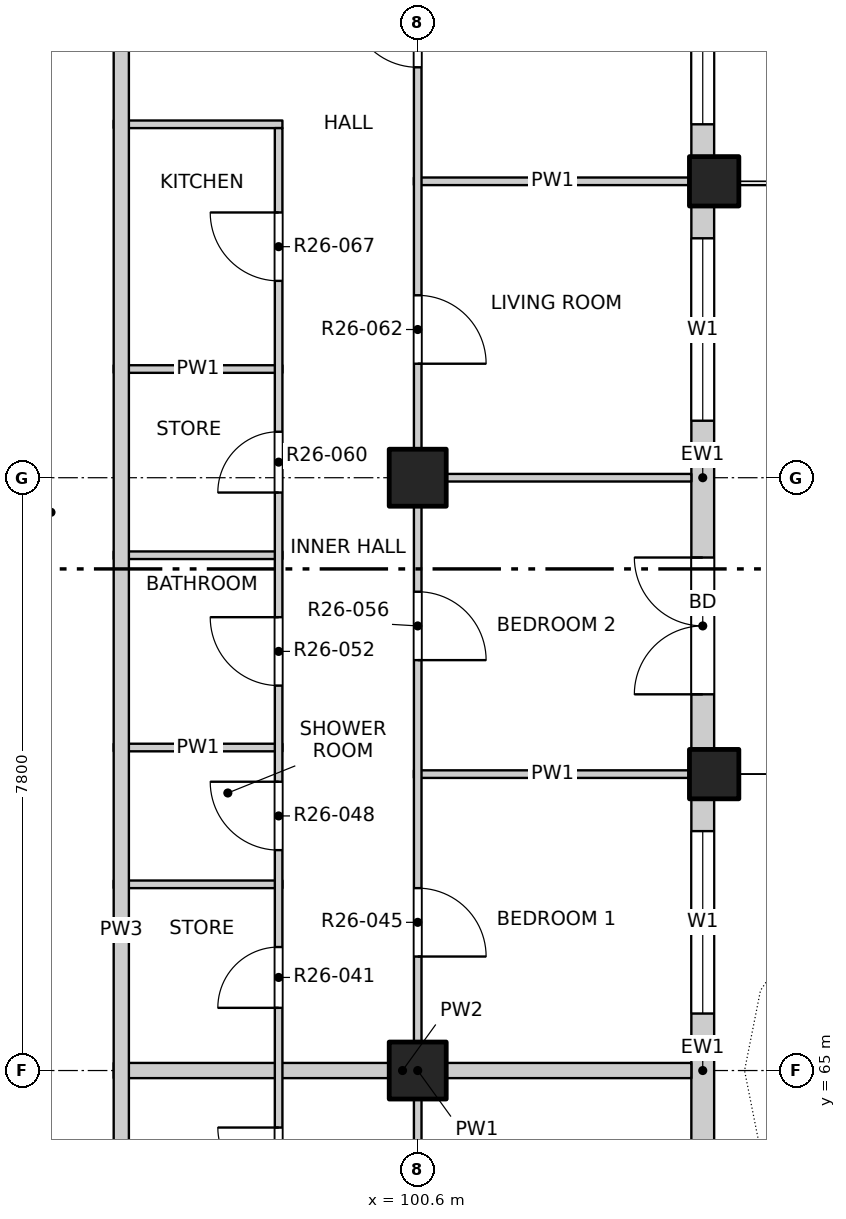
"""IFC4 building model, lengths in metres.
Left out: names, types, materials, properties, quantities, classifications, styles, units other than length and angle.
Written with IfcOpenShell. Run it as: python <this file> out.ifc"""

import sys

from ifc_helpers import new_model, si_unit, direction, frame, frame_2d, origin, origin_2d, place, context, subcontext, project, spatial, rectangle, extrude, element, fill, save


model = new_model("IFC4")
c1 = context("Model", 3, precision=1e-05, world=origin(), true_north=direction((0.0, 1.0)))
c2 = subcontext(c1, "Body", "Model", "MODEL_VIEW")
j1 = project(units=[si_unit("LENGTHUNIT", "METRE"), si_unit("PLANEANGLEUNIT", "RADIAN")], contexts=[c1])
p1 = place(None, origin())
s1 = spatial("IfcSite", under=j1, at=p1, CompositionType="ELEMENT")
p2 = place(p1, origin())
s2 = spatial("IfcBuilding", under=s1, at=p2, CompositionType="ELEMENT")
p3 = place(p2, frame((0.0, 0.0, 259.6)))
s3 = spatial("IfcBuildingStorey", under=s2, at=p3, CompositionType="ELEMENT", Elevation=259.6)
for number, where, z_axis, x_axis in (
    (1, (104.5, 68.9, -0.25), (0.0, 0.0, 1.0), (1.0, 0.0, 0.0)),
    (2, (104.5, 76.7, -0.25), (0.0, 0.0, 1.0), (1.0, 0.0, 0.0)),
):
    element("IfcColumn", number, at=place(p3, frame(where, z_axis=z_axis, x_axis=x_axis)), inside=s3, PredefinedType="COLUMN", context=c2, shape_type="SweptSolid", body=[
        extrude(rectangle(XDim=0.65, YDim=0.65, at=origin_2d()), origin(), (0.0, 0.0, 1.0), 3.4),
    ])
for number, where, z_axis, x_axis in (
    (3, (100.6, 65.0, -0.25), (0.0, 0.0, 1.0), (1.0, 0.0, 0.0)),
    (4, (100.6, 72.8, -0.25), (0.0, 0.0, 1.0), (1.0, 0.0, 0.0)),
):
    element("IfcColumn", number, at=place(p3, frame(where, z_axis=z_axis, x_axis=x_axis)), inside=s3, PredefinedType="COLUMN", context=c2, shape_type="SweptSolid", body=[
        extrude(rectangle(XDim=0.75, YDim=0.75, at=origin_2d()), origin(), (0.0, 0.0, 1.0), 3.4),
    ])
p4 = place(p3, frame((104.35, 61.425, 0.0), z_axis=(0.0, 0.0, 1.0), x_axis=(0.0, 1.0, 0.0)))
e5 = element("IfcWall", 5, at=p4, inside=s3, PredefinedType="SOLIDWALL", context=c2, shape_type="SweptSolid", body=[
    extrude(rectangle(XDim=7.15, YDim=0.3, at=frame_2d((3.575, 0.0))), origin(), (0.0, 0.0, 1.0), 3.15),
])
p5 = place(p4, frame((0.725, 0.0, 0.0)))
e6 = element("IfcOpeningElement", 6, at=p5, cuts=e5, PredefinedType="OPENING", context=c2, shape_type="SweptSolid", body=[
    extrude(rectangle(XDim=1.8, YDim=2.4, at=frame_2d((0.9, 1.2))), frame((0.0, 0.16, 0.0), z_axis=(0.0, -1.0, 0.0), x_axis=(1.0, 0.0, 0.0)), (0.0, 0.0, 1.0), 0.32),
])
p6 = place(p4, frame((4.325, 0.0, 0.9)))
e7 = element("IfcOpeningElement", 7, at=p6, cuts=e5, PredefinedType="OPENING", context=c2, shape_type="SweptSolid", body=[
    extrude(rectangle(XDim=2.4, YDim=1.8, at=frame_2d((1.2, 0.9))), frame((0.0, 0.16, 0.0), z_axis=(0.0, -1.0, 0.0), x_axis=(1.0, 0.0, 0.0)), (0.0, 0.0, 1.0), 0.32),
])
p7 = place(p3, frame((104.35, 69.225, 0.0), z_axis=(0.0, 0.0, 1.0), x_axis=(0.0, 1.0, 0.0)))
e8 = element("IfcWall", 8, at=p7, inside=s3, PredefinedType="SOLIDWALL", context=c2, shape_type="SweptSolid", body=[
    extrude(rectangle(XDim=7.15, YDim=0.3, at=frame_2d((3.575, 0.0))), origin(), (0.0, 0.0, 1.0), 3.15),
])
p8 = place(p7, frame((0.725, 0.0, 0.0)))
e9 = element("IfcOpeningElement", 9, at=p8, cuts=e8, PredefinedType="OPENING", context=c2, shape_type="SweptSolid", body=[
    extrude(rectangle(XDim=1.8, YDim=2.4, at=frame_2d((0.9, 1.2))), frame((0.0, 0.16, 0.0), z_axis=(0.0, -1.0, 0.0), x_axis=(1.0, 0.0, 0.0)), (0.0, 0.0, 1.0), 0.32),
])
p9 = place(p7, frame((4.325, 0.0, 0.9)))
e10 = element("IfcOpeningElement", 10, at=p9, cuts=e8, PredefinedType="OPENING", context=c2, shape_type="SweptSolid", body=[
    extrude(rectangle(XDim=2.4, YDim=1.8, at=frame_2d((1.2, 0.9))), frame((0.0, 0.16, 0.0), z_axis=(0.0, -1.0, 0.0), x_axis=(1.0, 0.0, 0.0)), (0.0, 0.0, 1.0), 0.32),
])
p10 = place(p3, frame((104.35, 77.025, 0.0), z_axis=(0.0, 0.0, 1.0), x_axis=(0.0, 1.0, 0.0)))
e11 = element("IfcWall", 11, at=p10, inside=s3, PredefinedType="SOLIDWALL", context=c2, shape_type="SweptSolid", body=[
    extrude(rectangle(XDim=3.575, YDim=0.3, at=frame_2d((1.788, 0.0))), origin(), (0.0, 0.0, 1.0), 3.15),
])
p11 = place(p10, frame((0.425, 0.0, 0.9)))
e12 = element("IfcOpeningElement", 12, at=p11, cuts=e11, PredefinedType="OPENING", context=c2, shape_type="SweptSolid", body=[
    extrude(rectangle(XDim=2.4, YDim=1.8, at=frame_2d((1.2, 0.9))), frame((0.0, 0.16, 0.0), z_axis=(0.0, -1.0, 0.0), x_axis=(1.0, 0.0, 0.0)), (0.0, 0.0, 1.0), 0.32),
])
p12 = place(p3, frame((96.6, 65.0, 0.0), z_axis=(0.0, 0.0, 1.0), x_axis=(1.0, 0.0, 0.0)))
e13 = element("IfcWall", 13, at=p12, inside=s3, PredefinedType="PARTITIONING", context=c2, shape_type="SweptSolid", body=[
    extrude(rectangle(XDim=7.6, YDim=0.2, at=frame_2d((3.8, 0.0))), origin(), (0.0, 0.0, 1.0), 3.15),
])
p13 = place(p3, frame((96.6, 67.45, 0.0), z_axis=(0.0, 0.0, 1.0), x_axis=(1.0, 0.0, 0.0)))
e14 = element("IfcWall", 14, at=p13, inside=s3, PredefinedType="PARTITIONING", context=c2, shape_type="SweptSolid", body=[
    extrude(rectangle(XDim=2.22, YDim=0.1, at=frame_2d((1.11, 0.0))), origin(), (0.0, 0.0, 1.0), 3.15),
])
p14 = place(p3, frame((100.55, 68.9, 0.0), z_axis=(0.0, 0.0, 1.0), x_axis=(1.0, 0.0, 0.0)))
e15 = element("IfcWall", 15, at=p14, inside=s3, PredefinedType="PARTITIONING", context=c2, shape_type="SweptSolid", body=[
    extrude(rectangle(XDim=3.65, YDim=0.1, at=frame_2d((1.825, 0.0))), origin(), (0.0, 0.0, 1.0), 3.15),
])
for number, where, z_axis, x_axis in (
    (16, (96.6, 69.25, 0.0), (0.0, 0.0, 1.0), (1.0, 0.0, 0.0)),
    (17, (96.6, 71.78, 0.0), (0.0, 0.0, 1.0), (1.0, 0.0, 0.0)),
):
    element("IfcWall", number, at=place(p3, frame(where, z_axis=z_axis, x_axis=x_axis)), inside=s3, PredefinedType="PARTITIONING", context=c2, shape_type="SweptSolid", body=[
        extrude(rectangle(XDim=2.22, YDim=0.1, at=frame_2d((1.11, 0.0))), origin(), (0.0, 0.0, 1.0), 3.15),
    ])
p15 = place(p3, frame((100.55, 72.8, 0.0), z_axis=(0.0, 0.0, 1.0), x_axis=(1.0, 0.0, 0.0)))
e18 = element("IfcWall", 18, at=p15, inside=s3, PredefinedType="PARTITIONING", context=c2, shape_type="SweptSolid", body=[
    extrude(rectangle(XDim=3.65, YDim=0.1, at=frame_2d((1.825, 0.0))), origin(), (0.0, 0.0, 1.0), 3.15),
])
p16 = place(p3, frame((96.6, 74.23, 0.0), z_axis=(0.0, 0.0, 1.0), x_axis=(1.0, 0.0, 0.0)))
e19 = element("IfcWall", 19, at=p16, inside=s3, PredefinedType="PARTITIONING", context=c2, shape_type="SweptSolid", body=[
    extrude(rectangle(XDim=2.22, YDim=0.1, at=frame_2d((1.11, 0.0))), origin(), (0.0, 0.0, 1.0), 3.15),
])
p17 = place(p3, frame((100.55, 76.7, 0.0), z_axis=(0.0, 0.0, 1.0), x_axis=(1.0, 0.0, 0.0)))
e20 = element("IfcWall", 20, at=p17, inside=s3, PredefinedType="PARTITIONING", context=c2, shape_type="SweptSolid", body=[
    extrude(rectangle(XDim=3.65, YDim=0.1, at=frame_2d((1.825, 0.0))), origin(), (0.0, 0.0, 1.0), 3.15),
])
p18 = place(p3, frame((96.6, 77.45, 0.0), z_axis=(0.0, 0.0, 1.0), x_axis=(1.0, 0.0, 0.0)))
e21 = element("IfcWall", 21, at=p18, inside=s3, PredefinedType="PARTITIONING", context=c2, shape_type="SweptSolid", body=[
    extrude(rectangle(XDim=2.22, YDim=0.1, at=frame_2d((1.11, 0.0))), origin(), (0.0, 0.0, 1.0), 3.15),
])
p19 = place(p3, frame((96.7, 49.5, 0.0), z_axis=(0.0, 0.0, 1.0), x_axis=(0.0, 1.0, 0.0)))
e22 = element("IfcWall", 22, at=p19, inside=s3, PredefinedType="PARTITIONING", context=c2, shape_type="SweptSolid", body=[
    extrude(rectangle(XDim=34.7, YDim=0.2, at=frame_2d((17.35, 0.0))), origin(), (0.0, 0.0, 1.0), 3.15),
])
p20 = place(p19, frame((10.425, 0.0, 0.0)))
e23 = element("IfcOpeningElement", 23, at=p20, cuts=e22, PredefinedType="OPENING", context=c2, shape_type="SweptSolid", body=[
    extrude(rectangle(XDim=1.0, YDim=2.1, at=frame_2d((0.5, 1.05))), frame((0.0, 0.11, 0.0), z_axis=(0.0, -1.0, 0.0), x_axis=(1.0, 0.0, 0.0)), (0.0, 0.0, 1.0), 0.22),
])
p21 = place(p19, frame((29.225, 0.0, 0.0)))
e24 = element("IfcOpeningElement", 24, at=p21, cuts=e22, PredefinedType="OPENING", context=c2, shape_type="SweptSolid", body=[
    extrude(rectangle(XDim=1.0, YDim=2.1, at=frame_2d((0.5, 1.05))), frame((0.0, 0.11, 0.0), z_axis=(0.0, -1.0, 0.0), x_axis=(1.0, 0.0, 0.0)), (0.0, 0.0, 1.0), 0.22),
])
p22 = place(p3, frame((98.77, 59.8, 0.0), z_axis=(0.0, 0.0, 1.0), x_axis=(0.0, 1.0, 0.0)))
e25 = element("IfcWall", 25, at=p22, inside=s3, PredefinedType="PARTITIONING", context=c2, shape_type="SweptSolid", body=[
    extrude(rectangle(XDim=17.6, YDim=0.1, at=frame_2d((8.8, 0.0))), origin(), (0.0, 0.0, 1.0), 3.15),
])
p23 = place(p22, frame((0.975, 0.0, 0.0)))
e26 = element("IfcOpeningElement", 26, at=p23, cuts=e25, PredefinedType="OPENING", context=c2, shape_type="SweptSolid", body=[
    extrude(rectangle(XDim=0.9, YDim=2.1, at=frame_2d((0.45, 1.05))), frame((0.0, 0.06, 0.0), z_axis=(0.0, -1.0, 0.0), x_axis=(1.0, 0.0, 0.0)), (0.0, 0.0, 1.0), 0.12),
])
p24 = place(p22, frame((3.65, 0.0, 0.0)))
e27 = element("IfcOpeningElement", 27, at=p24, cuts=e25, PredefinedType="OPENING", context=c2, shape_type="SweptSolid", body=[
    extrude(rectangle(XDim=0.8, YDim=2.1, at=frame_2d((0.4, 1.05))), frame((0.0, 0.06, 0.0), z_axis=(0.0, -1.0, 0.0), x_axis=(1.0, 0.0, 0.0)), (0.0, 0.0, 1.0), 0.12),
])
p25 = place(p22, frame((6.025, 0.0, 0.0)))
e28 = element("IfcOpeningElement", 28, at=p25, cuts=e25, PredefinedType="OPENING", context=c2, shape_type="SweptSolid", body=[
    extrude(rectangle(XDim=0.8, YDim=2.1, at=frame_2d((0.4, 1.05))), frame((0.0, 0.06, 0.0), z_axis=(0.0, -1.0, 0.0), x_axis=(1.0, 0.0, 0.0)), (0.0, 0.0, 1.0), 0.12),
])
p26 = place(p22, frame((8.1, 0.0, 0.0)))
e29 = element("IfcOpeningElement", 29, at=p26, cuts=e25, PredefinedType="OPENING", context=c2, shape_type="SweptSolid", body=[
    extrude(rectangle(XDim=0.9, YDim=2.1, at=frame_2d((0.45, 1.05))), frame((0.0, 0.06, 0.0), z_axis=(0.0, -1.0, 0.0), x_axis=(1.0, 0.0, 0.0)), (0.0, 0.0, 1.0), 0.12),
])
p27 = place(p22, frame((10.265, 0.0, 0.0)))
e30 = element("IfcOpeningElement", 30, at=p27, cuts=e25, PredefinedType="OPENING", context=c2, shape_type="SweptSolid", body=[
    extrude(rectangle(XDim=0.9, YDim=2.1, at=frame_2d((0.45, 1.05))), frame((0.0, 0.06, 0.0), z_axis=(0.0, -1.0, 0.0), x_axis=(1.0, 0.0, 0.0)), (0.0, 0.0, 1.0), 0.12),
])
p28 = place(p22, frame((12.805, 0.0, 0.0)))
e31 = element("IfcOpeningElement", 31, at=p28, cuts=e25, PredefinedType="OPENING", context=c2, shape_type="SweptSolid", body=[
    extrude(rectangle(XDim=0.8, YDim=2.1, at=frame_2d((0.4, 1.05))), frame((0.0, 0.06, 0.0), z_axis=(0.0, -1.0, 0.0), x_axis=(1.0, 0.0, 0.0)), (0.0, 0.0, 1.0), 0.12),
])
p29 = place(p22, frame((15.59, 0.0, 0.0)))
e32 = element("IfcOpeningElement", 32, at=p29, cuts=e25, PredefinedType="OPENING", context=c2, shape_type="SweptSolid", body=[
    extrude(rectangle(XDim=0.9, YDim=2.1, at=frame_2d((0.45, 1.05))), frame((0.0, 0.06, 0.0), z_axis=(0.0, -1.0, 0.0), x_axis=(1.0, 0.0, 0.0)), (0.0, 0.0, 1.0), 0.12),
])
p30 = place(p3, frame((100.6, 45.8, 0.0), z_axis=(0.0, 0.0, 1.0), x_axis=(0.0, 1.0, 0.0)))
e33 = element("IfcWall", 33, at=p30, inside=s3, PredefinedType="PARTITIONING", context=c2, shape_type="SweptSolid", body=[
    extrude(rectangle(XDim=38.4, YDim=0.1, at=frame_2d((19.2, 0.0))), origin(), (0.0, 0.0, 1.0), 3.15),
])
p31 = place(p30, frame((1.05, 0.0, 0.0)))
e34 = element("IfcOpeningElement", 34, at=p31, cuts=e33, PredefinedType="OPENING", context=c2, shape_type="SweptSolid", body=[
    extrude(rectangle(XDim=1.2, YDim=2.1, at=frame_2d((0.6, 1.05))), frame((0.0, 0.06, 0.0), z_axis=(0.0, -1.0, 0.0), x_axis=(1.0, 0.0, 0.0)), (0.0, 0.0, 1.0), 0.12),
])
p32 = place(p30, frame((5.1, 0.0, 0.0)))
e35 = element("IfcOpeningElement", 35, at=p32, cuts=e33, PredefinedType="OPENING", context=c2, shape_type="SweptSolid", body=[
    extrude(rectangle(XDim=0.9, YDim=2.1, at=frame_2d((0.45, 1.05))), frame((0.0, 0.06, 0.0), z_axis=(0.0, -1.0, 0.0), x_axis=(1.0, 0.0, 0.0)), (0.0, 0.0, 1.0), 0.12),
])
p33 = place(p30, frame((9.0, 0.0, 0.0)))
e36 = element("IfcOpeningElement", 36, at=p33, cuts=e33, PredefinedType="OPENING", context=c2, shape_type="SweptSolid", body=[
    extrude(rectangle(XDim=0.9, YDim=2.1, at=frame_2d((0.45, 1.05))), frame((0.0, 0.06, 0.0), z_axis=(0.0, -1.0, 0.0), x_axis=(1.0, 0.0, 0.0)), (0.0, 0.0, 1.0), 0.12),
])
p34 = place(p30, frame((12.9, 0.0, 0.0)))
e37 = element("IfcOpeningElement", 37, at=p34, cuts=e33, PredefinedType="OPENING", context=c2, shape_type="SweptSolid", body=[
    extrude(rectangle(XDim=0.9, YDim=2.1, at=frame_2d((0.45, 1.05))), frame((0.0, 0.06, 0.0), z_axis=(0.0, -1.0, 0.0), x_axis=(1.0, 0.0, 0.0)), (0.0, 0.0, 1.0), 0.12),
])
p35 = place(p30, frame((16.8, 0.0, 0.0)))
e38 = element("IfcOpeningElement", 38, at=p35, cuts=e33, PredefinedType="OPENING", context=c2, shape_type="SweptSolid", body=[
    extrude(rectangle(XDim=0.9, YDim=2.1, at=frame_2d((0.45, 1.05))), frame((0.0, 0.06, 0.0), z_axis=(0.0, -1.0, 0.0), x_axis=(1.0, 0.0, 0.0)), (0.0, 0.0, 1.0), 0.12),
])
p36 = place(p30, frame((20.7, 0.0, 0.0)))
e39 = element("IfcOpeningElement", 39, at=p36, cuts=e33, PredefinedType="OPENING", context=c2, shape_type="SweptSolid", body=[
    extrude(rectangle(XDim=0.9, YDim=2.1, at=frame_2d((0.45, 1.05))), frame((0.0, 0.06, 0.0), z_axis=(0.0, -1.0, 0.0), x_axis=(1.0, 0.0, 0.0)), (0.0, 0.0, 1.0), 0.12),
])
p37 = place(p30, frame((24.6, 0.0, 0.0)))
e40 = element("IfcOpeningElement", 40, at=p37, cuts=e33, PredefinedType="OPENING", context=c2, shape_type="SweptSolid", body=[
    extrude(rectangle(XDim=0.9, YDim=2.1, at=frame_2d((0.45, 1.05))), frame((0.0, 0.06, 0.0), z_axis=(0.0, -1.0, 0.0), x_axis=(1.0, 0.0, 0.0)), (0.0, 0.0, 1.0), 0.12),
])
p38 = place(p30, frame((28.5, 0.0, 0.0)))
e41 = element("IfcOpeningElement", 41, at=p38, cuts=e33, PredefinedType="OPENING", context=c2, shape_type="SweptSolid", body=[
    extrude(rectangle(XDim=0.9, YDim=2.1, at=frame_2d((0.45, 1.05))), frame((0.0, 0.06, 0.0), z_axis=(0.0, -1.0, 0.0), x_axis=(1.0, 0.0, 0.0)), (0.0, 0.0, 1.0), 0.12),
])
p39 = place(p30, frame((32.4, 0.0, 0.0)))
e42 = element("IfcOpeningElement", 42, at=p39, cuts=e33, PredefinedType="OPENING", context=c2, shape_type="SweptSolid", body=[
    extrude(rectangle(XDim=0.9, YDim=2.1, at=frame_2d((0.45, 1.05))), frame((0.0, 0.06, 0.0), z_axis=(0.0, -1.0, 0.0), x_axis=(1.0, 0.0, 0.0)), (0.0, 0.0, 1.0), 0.12),
])
p40 = place(p30, frame((36.15, 0.0, 0.0)))
e43 = element("IfcOpeningElement", 43, at=p40, cuts=e33, PredefinedType="OPENING", context=c2, shape_type="SweptSolid", body=[
    extrude(rectangle(XDim=1.2, YDim=2.1, at=frame_2d((0.6, 1.05))), frame((0.0, 0.06, 0.0), z_axis=(0.0, -1.0, 0.0), x_axis=(1.0, 0.0, 0.0)), (0.0, 0.0, 1.0), 0.12),
])
p41 = place(p6, origin())
e44 = element("IfcWindow", 44, at=p41, inside=s3, PartitioningType="DOUBLE_PANEL_VERTICAL", PredefinedType="WINDOW", context=c2, shape_type="SweptSolid", body=[
    extrude(rectangle(XDim=2.4, YDim=1.8, at=frame_2d((1.2, 0.9))), frame((0.0, 0.03, 0.0), z_axis=(0.0, -1.0, 0.0), x_axis=(1.0, 0.0, 0.0)), (0.0, 0.0, 1.0), 0.06),
])
fill(e7, e44)
p42 = place(p8, origin())
e45 = element("IfcDoor", 45, at=p42, inside=s3, OperationType="DOUBLE_DOOR_SINGLE_SWING", PredefinedType="DOOR", context=c2, shape_type="SweptSolid", body=[
    extrude(rectangle(XDim=1.8, YDim=2.4, at=frame_2d((0.9, 1.2))), frame((0.0, 0.025, 0.0), z_axis=(0.0, -1.0, 0.0), x_axis=(1.0, 0.0, 0.0)), (0.0, 0.0, 1.0), 0.05),
])
fill(e9, e45)
p43 = place(p9, origin())
e46 = element("IfcWindow", 46, at=p43, inside=s3, PartitioningType="DOUBLE_PANEL_VERTICAL", PredefinedType="WINDOW", context=c2, shape_type="SweptSolid", body=[
    extrude(rectangle(XDim=2.4, YDim=1.8, at=frame_2d((1.2, 0.9))), frame((0.0, 0.03, 0.0), z_axis=(0.0, -1.0, 0.0), x_axis=(1.0, 0.0, 0.0)), (0.0, 0.0, 1.0), 0.06),
])
fill(e10, e46)
p44 = place(p11, origin())
e47 = element("IfcWindow", 47, at=p44, inside=s3, PartitioningType="DOUBLE_PANEL_VERTICAL", PredefinedType="WINDOW", context=c2, shape_type="SweptSolid", body=[
    extrude(rectangle(XDim=2.4, YDim=1.8, at=frame_2d((1.2, 0.9))), frame((0.0, 0.03, 0.0), z_axis=(0.0, -1.0, 0.0), x_axis=(1.0, 0.0, 0.0)), (0.0, 0.0, 1.0), 0.06),
])
fill(e12, e47)
p45 = place(p24, origin())
e48 = element("IfcDoor", 48, at=p45, inside=s3, OperationType="SINGLE_SWING_RIGHT", PredefinedType="DOOR", context=c2, shape_type="SweptSolid", body=[
    extrude(rectangle(XDim=0.8, YDim=2.1, at=frame_2d((0.4, 1.05))), frame((0.0, 0.025, 0.0), z_axis=(0.0, -1.0, 0.0), x_axis=(1.0, 0.0, 0.0)), (0.0, 0.0, 1.0), 0.05),
])
fill(e27, e48)
p46 = place(p25, origin())
e49 = element("IfcDoor", 49, at=p46, inside=s3, OperationType="SINGLE_SWING_LEFT", PredefinedType="DOOR", context=c2, shape_type="SweptSolid", body=[
    extrude(rectangle(XDim=0.8, YDim=2.1, at=frame_2d((0.4, 1.05))), frame((0.0, 0.025, 0.0), z_axis=(0.0, -1.0, 0.0), x_axis=(1.0, 0.0, 0.0)), (0.0, 0.0, 1.0), 0.05),
])
fill(e28, e49)
p47 = place(p36, origin())
e50 = element("IfcDoor", 50, at=p47, inside=s3, OperationType="SINGLE_SWING_RIGHT", PredefinedType="DOOR", context=c2, shape_type="SweptSolid", body=[
    extrude(rectangle(XDim=0.9, YDim=2.1, at=frame_2d((0.45, 1.05))), frame((0.0, 0.025, 0.0), z_axis=(0.0, -1.0, 0.0), x_axis=(1.0, 0.0, 0.0)), (0.0, 0.0, 1.0), 0.05),
])
fill(e39, e50)
p48 = place(p26, origin())
e51 = element("IfcDoor", 51, at=p48, inside=s3, OperationType="SINGLE_SWING_RIGHT", PredefinedType="DOOR", context=c2, shape_type="SweptSolid", body=[
    extrude(rectangle(XDim=0.9, YDim=2.1, at=frame_2d((0.45, 1.05))), frame((0.0, 0.025, 0.0), z_axis=(0.0, -1.0, 0.0), x_axis=(1.0, 0.0, 0.0)), (0.0, 0.0, 1.0), 0.05),
])
fill(e29, e51)
p49 = place(p27, origin())
e52 = element("IfcDoor", 52, at=p49, inside=s3, OperationType="SINGLE_SWING_RIGHT", PredefinedType="DOOR", context=c2, shape_type="SweptSolid", body=[
    extrude(rectangle(XDim=0.9, YDim=2.1, at=frame_2d((0.45, 1.05))), frame((0.0, 0.025, 0.0), z_axis=(0.0, -1.0, 0.0), x_axis=(1.0, 0.0, 0.0)), (0.0, 0.0, 1.0), 0.05),
])
fill(e30, e52)
p50 = place(p37, origin())
e53 = element("IfcDoor", 53, at=p50, inside=s3, OperationType="SINGLE_SWING_RIGHT", PredefinedType="DOOR", context=c2, shape_type="SweptSolid", body=[
    extrude(rectangle(XDim=0.9, YDim=2.1, at=frame_2d((0.45, 1.05))), frame((0.0, 0.025, 0.0), z_axis=(0.0, -1.0, 0.0), x_axis=(1.0, 0.0, 0.0)), (0.0, 0.0, 1.0), 0.05),
])
fill(e40, e53)
p51 = place(p28, origin())
e54 = element("IfcDoor", 54, at=p51, inside=s3, OperationType="SINGLE_SWING_LEFT", PredefinedType="DOOR", context=c2, shape_type="SweptSolid", body=[
    extrude(rectangle(XDim=0.8, YDim=2.1, at=frame_2d((0.4, 1.05))), frame((0.0, 0.025, 0.0), z_axis=(0.0, -1.0, 0.0), x_axis=(1.0, 0.0, 0.0)), (0.0, 0.0, 1.0), 0.05),
])
fill(e31, e54)
p52 = place(p38, origin())
e55 = element("IfcDoor", 55, at=p52, inside=s3, OperationType="SINGLE_SWING_RIGHT", PredefinedType="DOOR", context=c2, shape_type="SweptSolid", body=[
    extrude(rectangle(XDim=0.9, YDim=2.1, at=frame_2d((0.45, 1.05))), frame((0.0, 0.025, 0.0), z_axis=(0.0, -1.0, 0.0), x_axis=(1.0, 0.0, 0.0)), (0.0, 0.0, 1.0), 0.05),
])
fill(e41, e55)
p53 = place(p29, origin())
e56 = element("IfcDoor", 56, at=p53, inside=s3, OperationType="SINGLE_SWING_RIGHT", PredefinedType="DOOR", context=c2, shape_type="SweptSolid", body=[
    extrude(rectangle(XDim=0.9, YDim=2.1, at=frame_2d((0.45, 1.05))), frame((0.0, 0.025, 0.0), z_axis=(0.0, -1.0, 0.0), x_axis=(1.0, 0.0, 0.0)), (0.0, 0.0, 1.0), 0.05),
])
fill(e32, e56)
p54 = place(p39, origin())
e57 = element("IfcDoor", 57, at=p54, inside=s3, OperationType="SINGLE_SWING_RIGHT", PredefinedType="DOOR", context=c2, shape_type="SweptSolid", body=[
    extrude(rectangle(XDim=0.9, YDim=2.1, at=frame_2d((0.45, 1.05))), frame((0.0, 0.025, 0.0), z_axis=(0.0, -1.0, 0.0), x_axis=(1.0, 0.0, 0.0)), (0.0, 0.0, 1.0), 0.05),
])
fill(e42, e57)
save(model, sys.argv[1])
